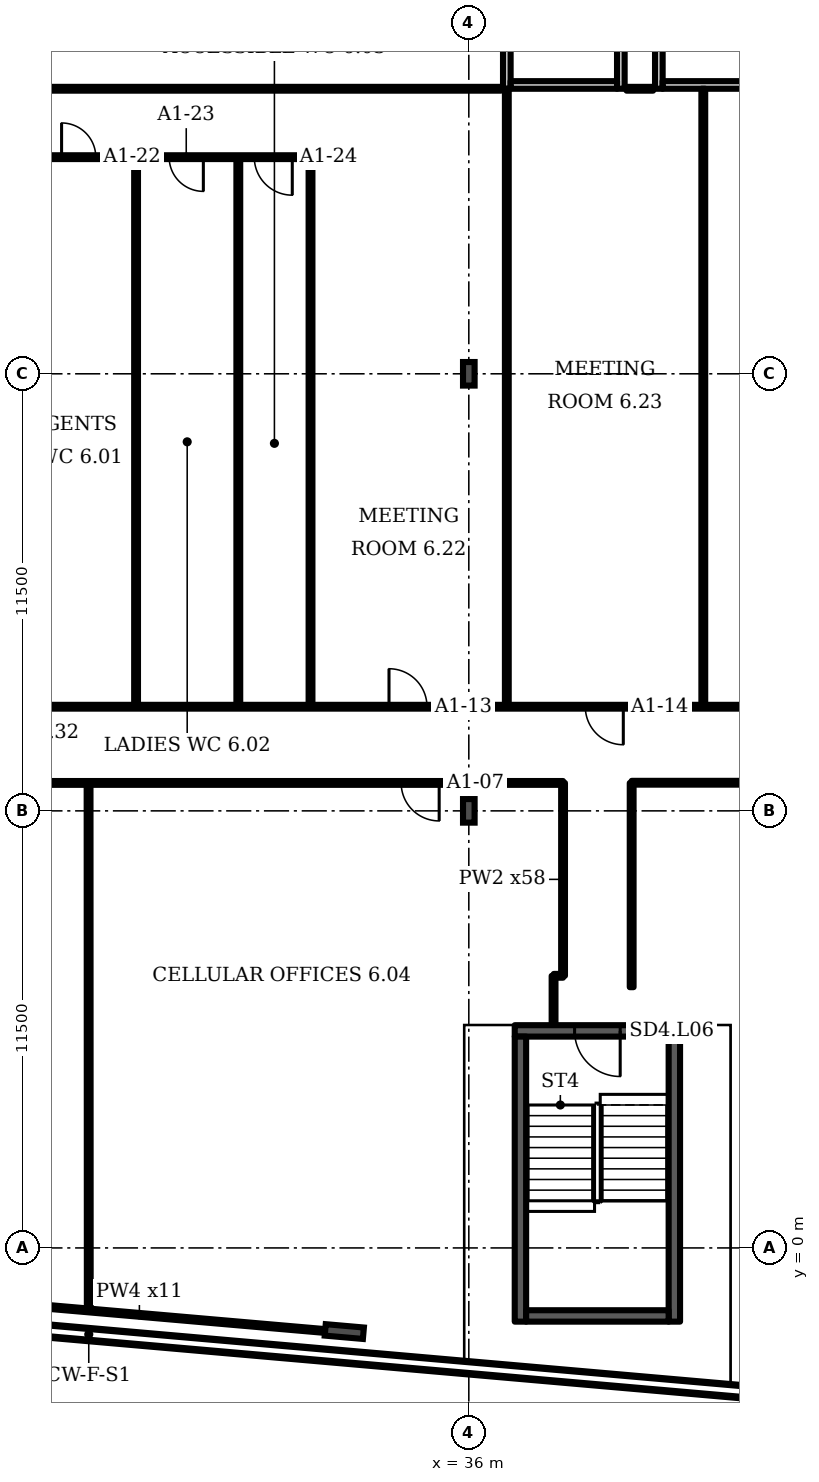
"""IFC4 building model, lengths in metres.
Left out: names, types, materials, properties, quantities, classifications, styles, units other than length and angle.
Written with IfcOpenShell. Run it as: python <this file> out.ifc"""

import sys

from ifc_helpers import new_model, si_unit, direction, frame, frame_2d, origin, origin_2d, place, context, subcontext, project, spatial, rectangle, i_section, extrude, element, fill, save


model = new_model("IFC4")
c1 = context("Model", 3, precision=1e-05, world=origin(), true_north=direction((0.0, 1.0)))
c2 = subcontext(c1, "Body", "Model", "MODEL_VIEW")
j1 = project(units=[si_unit("LENGTHUNIT", "METRE"), si_unit("PLANEANGLEUNIT", "RADIAN")], contexts=[c1])
p1 = place(None, origin())
s1 = spatial("IfcSite", under=j1, at=p1, CompositionType="ELEMENT")
p2 = place(p1, origin())
s2 = spatial("IfcBuilding", under=s1, at=p2, CompositionType="ELEMENT")
p3 = place(p2, frame((0.0, 0.0, 41.5)))
s3 = spatial("IfcBuildingStorey", under=s2, at=p3, CompositionType="ELEMENT", Elevation=41.5)
p4 = place(p3, frame((32.724, -2.2, 0.0), z_axis=(0.0, 0.0, 1.0), x_axis=(-0.087156, -0.996198, 0.0)))
e1 = element("IfcColumn", 1, at=p4, inside=s3, PredefinedType="COLUMN", context=c2, shape_type="SweptSolid", body=[
    extrude(i_section(OverallWidth=0.302, OverallDepth=1.008, WebThickness=0.021, FlangeThickness=0.04, FilletRadius=0.03, at=origin_2d()), origin(), (0.0, 0.0, 1.0), 3.6),
])
for number, where, z_axis, x_axis in (
    (2, (36.0, 11.5, 0.0), (0.0, 0.0, 1.0), (1.0, 0.0, 0.0)),
    (3, (36.0, 23.0, 0.0), (0.0, 0.0, 1.0), (1.0, 0.0, 0.0)),
):
    element("IfcColumn", number, at=place(p3, frame(where, z_axis=z_axis, x_axis=x_axis)), inside=s3, PredefinedType="COLUMN", context=c2, shape_type="SweptSolid", body=[
        extrude(i_section(OverallWidth=0.305, OverallDepth=0.62, WebThickness=0.021, FlangeThickness=0.04, FilletRadius=0.027, at=origin_2d()), origin(), (0.0, 0.0, 1.0), 3.6),
    ])
p5 = place(p3, frame((5.835, -0.516, 0.0), z_axis=(0.0, 0.0, 1.0), x_axis=(0.996195, -0.087152, 0.0)))
e4 = element("IfcWall", 4, at=p5, inside=s3, PredefinedType="SOLIDWALL", context=c2, shape_type="SweptSolid", body=[
    extrude(rectangle(XDim=40.333, YDim=0.35, at=frame_2d((20.167, 0.0))), origin(), (0.0, 0.0, 1.0), 1.0),
])
p6 = place(p3, frame((37.0, 30.5, 0.0), z_axis=(0.0, 0.0, 1.0), x_axis=(0.0, 1.0, 0.0)))
e5 = element("IfcWall", 5, at=p6, inside=s3, PredefinedType="PARTITIONING", context=c2, shape_type="SweptSolid", body=[
    extrude(rectangle(XDim=3.5, YDim=0.2, at=frame_2d((1.75, 0.0))), origin(), (0.0, 0.0, 1.0), 3.2),
])
p7 = place(p6, frame((1.2, 0.0, 0.0)))
e6 = element("IfcOpeningElement", 6, at=p7, cuts=e5, PredefinedType="OPENING", context=c2, shape_type="SweptSolid", body=[
    extrude(rectangle(XDim=1.1, YDim=2.1, at=frame_2d((0.55, 1.05))), frame((0.0, 0.11, 0.0), z_axis=(0.0, -1.0, 0.0), x_axis=(1.0, 0.0, 0.0)), (0.0, 0.0, 1.0), 0.22),
])
p8 = place(p3, frame((40.0, 30.5, 0.0), z_axis=(0.0, 0.0, 1.0), x_axis=(0.0, 1.0, 0.0)))
e7 = element("IfcWall", 7, at=p8, inside=s3, PredefinedType="PARTITIONING", context=c2, shape_type="SweptSolid", body=[
    extrude(rectangle(XDim=3.5, YDim=0.2, at=frame_2d((1.75, 0.0))), origin(), (0.0, 0.0, 1.0), 3.2),
])
p9 = place(p3, frame((37.1, 30.6, 0.0), z_axis=(0.0, 0.0, 1.0), x_axis=(1.0, 0.0, 0.0)))
e8 = element("IfcWall", 8, at=p9, inside=s3, PredefinedType="PARTITIONING", context=c2, shape_type="SweptSolid", body=[
    extrude(rectangle(XDim=2.8, YDim=0.2, at=frame_2d((1.4, 0.0))), origin(), (0.0, 0.0, 1.0), 3.2),
])
p10 = place(p3, frame((41.0, 30.5, 0.0), z_axis=(0.0, 0.0, 1.0), x_axis=(0.0, 1.0, 0.0)))
e9 = element("IfcWall", 9, at=p10, inside=s3, PredefinedType="PARTITIONING", context=c2, shape_type="SweptSolid", body=[
    extrude(rectangle(XDim=3.5, YDim=0.2, at=frame_2d((1.75, 0.0))), origin(), (0.0, 0.0, 1.0), 3.2),
])
p11 = place(p3, frame((41.1, 30.6, 0.0), z_axis=(0.0, 0.0, 1.0), x_axis=(1.0, 0.0, 0.0)))
e10 = element("IfcWall", 10, at=p11, inside=s3, PredefinedType="PARTITIONING", context=c2, shape_type="SweptSolid", body=[
    extrude(rectangle(XDim=2.8, YDim=0.2, at=frame_2d((1.4, 0.0))), origin(), (0.0, 0.0, 1.0), 3.2),
])
p12 = place(p3, frame((37.208, 5.711, 0.0), z_axis=(0.0, 0.0, 1.0), x_axis=(1.0, 0.0, 0.0)))
e11 = element("IfcWall", 11, at=p12, inside=s3, PredefinedType="SHEAR", context=c2, shape_type="SweptSolid", body=[
    extrude(rectangle(XDim=4.35, YDim=0.3, at=frame_2d((2.175, 0.0))), origin(), (0.0, 0.0, 1.0), 3.2),
])
p13 = place(p12, frame((1.575, 0.0, 0.0)))
e12 = element("IfcOpeningElement", 12, at=p13, cuts=e11, PredefinedType="OPENING", context=c2, shape_type="SweptSolid", body=[
    extrude(rectangle(XDim=1.2, YDim=2.1, at=frame_2d((0.6, 1.05))), frame((0.0, 0.16, 0.0), z_axis=(0.0, -1.0, 0.0), x_axis=(1.0, 0.0, 0.0)), (0.0, 0.0, 1.0), 0.32),
])
p14 = place(p3, frame((0.02, 12.235, 0.0), z_axis=(0.0, 0.0, 1.0), x_axis=(1.0, 0.0, 0.0)))
e13 = element("IfcWall", 13, at=p14, inside=s3, PredefinedType="PARTITIONING", context=c2, shape_type="SweptSolid", body=[
    extrude(rectangle(XDim=38.46, YDim=0.1, at=frame_2d((19.23, 0.0))), origin(), (0.0, 0.0, 1.0), 3.2),
])
p15 = place(p14, frame((2.405, 0.0, 0.0)))
e14 = element("IfcOpeningElement", 14, at=p15, cuts=e13, PredefinedType="OPENING", context=c2, shape_type="SweptSolid", body=[
    extrude(rectangle(XDim=1.0, YDim=2.1, at=frame_2d((0.5, 1.05))), frame((0.0, 0.06, 0.0), z_axis=(0.0, -1.0, 0.0), x_axis=(1.0, 0.0, 0.0)), (0.0, 0.0, 1.0), 0.12),
])
p16 = place(p14, frame((7.405, 0.0, 0.0)))
e15 = element("IfcOpeningElement", 15, at=p16, cuts=e13, PredefinedType="OPENING", context=c2, shape_type="SweptSolid", body=[
    extrude(rectangle(XDim=1.0, YDim=2.1, at=frame_2d((0.5, 1.05))), frame((0.0, 0.06, 0.0), z_axis=(0.0, -1.0, 0.0), x_axis=(1.0, 0.0, 0.0)), (0.0, 0.0, 1.0), 0.12),
])
p17 = place(p14, frame((13.405, 0.0, 0.0)))
e16 = element("IfcOpeningElement", 16, at=p17, cuts=e13, PredefinedType="OPENING", context=c2, shape_type="SweptSolid", body=[
    extrude(rectangle(XDim=1.0, YDim=2.1, at=frame_2d((0.5, 1.05))), frame((0.0, 0.06, 0.0), z_axis=(0.0, -1.0, 0.0), x_axis=(1.0, 0.0, 0.0)), (0.0, 0.0, 1.0), 0.12),
])
p18 = place(p14, frame((19.48, 0.0, 0.0)))
e17 = element("IfcOpeningElement", 17, at=p18, cuts=e13, PredefinedType="OPENING", context=c2, shape_type="SweptSolid", body=[
    extrude(rectangle(XDim=1.0, YDim=2.1, at=frame_2d((0.5, 1.05))), frame((0.0, 0.06, 0.0), z_axis=(0.0, -1.0, 0.0), x_axis=(1.0, 0.0, 0.0)), (0.0, 0.0, 1.0), 0.12),
])
p19 = place(p14, frame((22.205, 0.0, 0.0)))
e18 = element("IfcOpeningElement", 18, at=p19, cuts=e13, PredefinedType="OPENING", context=c2, shape_type="SweptSolid", body=[
    extrude(rectangle(XDim=1.0, YDim=2.1, at=frame_2d((0.5, 1.05))), frame((0.0, 0.06, 0.0), z_axis=(0.0, -1.0, 0.0), x_axis=(1.0, 0.0, 0.0)), (0.0, 0.0, 1.0), 0.12),
])
p20 = place(p14, frame((34.2, 0.0, 0.0)))
e19 = element("IfcOpeningElement", 19, at=p20, cuts=e13, PredefinedType="OPENING", context=c2, shape_type="SweptSolid", body=[
    extrude(rectangle(XDim=1.0, YDim=2.1, at=frame_2d((0.5, 1.05))), frame((0.0, 0.06, 0.0), z_axis=(0.0, -1.0, 0.0), x_axis=(1.0, 0.0, 0.0)), (0.0, 0.0, 1.0), 0.12),
])
p21 = place(p3, frame((10.8, 30.5, 0.0), z_axis=(0.0, 0.0, 1.0), x_axis=(1.0, 0.0, 0.0)))
e20 = element("IfcWall", 20, at=p21, inside=s3, PredefinedType="PARTITIONING", context=c2, shape_type="SweptSolid", body=[
    extrude(rectangle(XDim=26.05, YDim=0.1, at=frame_2d((13.025, 0.0))), origin(), (0.0, 0.0, 1.0), 3.2),
])
p22 = place(p21, frame((0.235, 0.0, 0.0)))
e21 = element("IfcOpeningElement", 21, at=p22, cuts=e20, PredefinedType="OPENING", context=c2, shape_type="SweptSolid", body=[
    extrude(rectangle(XDim=1.0, YDim=2.1, at=frame_2d((0.5, 1.05))), frame((0.0, 0.06, 0.0), z_axis=(0.0, -1.0, 0.0), x_axis=(1.0, 0.0, 0.0)), (0.0, 0.0, 1.0), 0.12),
])
p23 = place(p21, frame((10.955, 0.0, 0.0)))
e22 = element("IfcOpeningElement", 22, at=p23, cuts=e20, PredefinedType="OPENING", context=c2, shape_type="SweptSolid", body=[
    extrude(rectangle(XDim=1.0, YDim=2.1, at=frame_2d((0.5, 1.05))), frame((0.0, 0.06, 0.0), z_axis=(0.0, -1.0, 0.0), x_axis=(1.0, 0.0, 0.0)), (0.0, 0.0, 1.0), 0.12),
])
p24 = place(p3, frame((11.2, 14.24, 0.0), z_axis=(0.0, 0.0, 1.0), x_axis=(1.0, 0.0, 0.0)))
e23 = element("IfcWall", 23, at=p24, inside=s3, PredefinedType="PARTITIONING", context=c2, shape_type="SweptSolid", body=[
    extrude(rectangle(XDim=51.635, YDim=0.1, at=frame_2d((25.817, 0.0))), origin(), (0.0, 0.0, 1.0), 3.2),
])
p25 = place(p24, frame((0.115, 0.0, 0.0)))
e24 = element("IfcOpeningElement", 24, at=p25, cuts=e23, PredefinedType="OPENING", context=c2, shape_type="SweptSolid", body=[
    extrude(rectangle(XDim=1.0, YDim=2.1, at=frame_2d((0.5, 1.05))), frame((0.0, 0.06, 0.0), z_axis=(0.0, -1.0, 0.0), x_axis=(1.0, 0.0, 0.0)), (0.0, 0.0, 1.0), 0.12),
])
p26 = place(p24, frame((6.635, 0.0, 0.0)))
e25 = element("IfcOpeningElement", 25, at=p26, cuts=e23, PredefinedType="OPENING", context=c2, shape_type="SweptSolid", body=[
    extrude(rectangle(XDim=1.0, YDim=2.1, at=frame_2d((0.5, 1.05))), frame((0.0, 0.06, 0.0), z_axis=(0.0, -1.0, 0.0), x_axis=(1.0, 0.0, 0.0)), (0.0, 0.0, 1.0), 0.12),
])
p27 = place(p24, frame((22.7, 0.0, 0.0)))
e26 = element("IfcOpeningElement", 26, at=p27, cuts=e23, PredefinedType="OPENING", context=c2, shape_type="SweptSolid", body=[
    extrude(rectangle(XDim=1.0, YDim=2.1, at=frame_2d((0.5, 1.05))), frame((0.0, 0.06, 0.0), z_axis=(0.0, -1.0, 0.0), x_axis=(1.0, 0.0, 0.0)), (0.0, 0.0, 1.0), 0.12),
])
p28 = place(p24, frame((27.865, 0.0, 0.0)))
e27 = element("IfcOpeningElement", 27, at=p28, cuts=e23, PredefinedType="OPENING", context=c2, shape_type="SweptSolid", body=[
    extrude(rectangle(XDim=1.0, YDim=2.1, at=frame_2d((0.5, 1.05))), frame((0.0, 0.06, 0.0), z_axis=(0.0, -1.0, 0.0), x_axis=(1.0, 0.0, 0.0)), (0.0, 0.0, 1.0), 0.12),
])
p29 = place(p24, frame((34.065, 0.0, 0.0)))
e28 = element("IfcOpeningElement", 28, at=p29, cuts=e23, PredefinedType="OPENING", context=c2, shape_type="SweptSolid", body=[
    extrude(rectangle(XDim=1.8, YDim=2.1, at=frame_2d((0.9, 1.05))), frame((0.0, 0.06, 0.0), z_axis=(0.0, -1.0, 0.0), x_axis=(1.0, 0.0, 0.0)), (0.0, 0.0, 1.0), 0.12),
])
p30 = place(p24, frame((41.765, 0.0, 0.0)))
e29 = element("IfcOpeningElement", 29, at=p30, cuts=e23, PredefinedType="OPENING", context=c2, shape_type="SweptSolid", body=[
    extrude(rectangle(XDim=1.8, YDim=2.1, at=frame_2d((0.9, 1.05))), frame((0.0, 0.06, 0.0), z_axis=(0.0, -1.0, 0.0), x_axis=(1.0, 0.0, 0.0)), (0.0, 0.0, 1.0), 0.12),
])
p31 = place(p3, frame((24.335, 28.7, 0.0), z_axis=(0.0, 0.0, 1.0), x_axis=(1.0, 0.0, 0.0)))
e30 = element("IfcWall", 30, at=p31, inside=s3, PredefinedType="PARTITIONING", context=c2, shape_type="SweptSolid", body=[
    extrude(rectangle(XDim=7.5, YDim=0.1, at=frame_2d((3.75, 0.0))), origin(), (0.0, 0.0, 1.0), 3.2),
])
p32 = place(p31, frame((0.95, 0.0, 0.0)))
e31 = element("IfcOpeningElement", 31, at=p32, cuts=e30, PredefinedType="OPENING", context=c2, shape_type="SweptSolid", body=[
    extrude(rectangle(XDim=0.9, YDim=2.1, at=frame_2d((0.45, 1.05))), frame((0.0, 0.06, 0.0), z_axis=(0.0, -1.0, 0.0), x_axis=(1.0, 0.0, 0.0)), (0.0, 0.0, 1.0), 0.12),
])
p33 = place(p31, frame((3.78, 0.0, 0.0)))
e32 = element("IfcOpeningElement", 32, at=p33, cuts=e30, PredefinedType="OPENING", context=c2, shape_type="SweptSolid", body=[
    extrude(rectangle(XDim=0.9, YDim=2.1, at=frame_2d((0.45, 1.05))), frame((0.0, 0.06, 0.0), z_axis=(0.0, -1.0, 0.0), x_axis=(1.0, 0.0, 0.0)), (0.0, 0.0, 1.0), 0.12),
])
p34 = place(p31, frame((6.02, 0.0, 0.0)))
e33 = element("IfcOpeningElement", 33, at=p34, cuts=e30, PredefinedType="OPENING", context=c2, shape_type="SweptSolid", body=[
    extrude(rectangle(XDim=1.0, YDim=2.1, at=frame_2d((0.5, 1.05))), frame((0.0, 0.06, 0.0), z_axis=(0.0, -1.0, 0.0), x_axis=(1.0, 0.0, 0.0)), (0.0, 0.0, 1.0), 0.12),
])
p35 = place(p3, frame((26.0, -1.645, 0.0), z_axis=(0.0, 0.0, 1.0), x_axis=(-0.000352, 1.000004, 0.0)))
e34 = element("IfcWall", 34, at=p35, inside=s3, PredefinedType="PARTITIONING", context=c2, shape_type="SweptSolid", body=[
    extrude(rectangle(XDim=13.88, YDim=0.1, at=frame_2d((6.94, 0.0))), origin(), (0.0, 0.0, 1.0), 3.2),
])
for number, where, z_axis, x_axis in (
    (35, (27.245, 14.24, 0.0), (0.0, 0.0, 1.0), (0.0, 1.0, 0.0)),
    (36, (29.935, 14.24, 0.0), (0.0, 0.0, 1.0), (0.0, 1.0, 0.0)),
    (37, (31.835, 14.24, 0.0), (0.0, 0.0, 1.0), (0.0, 1.0, 0.0)),
):
    element("IfcWall", number, at=place(p3, frame(where, z_axis=z_axis, x_axis=x_axis)), inside=s3, PredefinedType="PARTITIONING", context=c2, shape_type="SweptSolid", body=[
        extrude(rectangle(XDim=14.46, YDim=0.1, at=frame_2d((7.23, 0.0))), origin(), (0.0, 0.0, 1.0), 3.2),
    ])
p36 = place(p3, frame((32.665, -2.225, 0.0), z_axis=(0.0, 0.0, 1.0), x_axis=(-0.99623, 0.086702, 0.0)))
e38 = element("IfcWall", 38, at=p36, inside=s3, PredefinedType="PARTITIONING", context=c2, shape_type="SweptSolid", body=[
    extrude(rectangle(XDim=10.706, YDim=0.1, at=frame_2d((5.353, 0.0))), origin(), (0.0, 0.0, 1.0), 2.58),
])
p37 = place(p3, frame((37.0, 14.24, 0.0), z_axis=(0.0, 0.0, 1.0), x_axis=(0.0, 1.0, 0.0)))
e39 = element("IfcWall", 39, at=p37, inside=s3, PredefinedType="PARTITIONING", context=c2, shape_type="SweptSolid", body=[
    extrude(rectangle(XDim=16.26, YDim=0.1, at=frame_2d((8.13, 0.0))), origin(), (0.0, 0.0, 1.0), 3.2),
])
p38 = place(p3, frame((38.23, 5.881, 0.0), z_axis=(0.0, 0.0, 1.0), x_axis=(0.0, 1.0, 0.0)))
e40 = element("IfcWall", 40, at=p38, inside=s3, PredefinedType="PARTITIONING", context=c2, shape_type="SweptSolid", body=[
    extrude(rectangle(XDim=1.279, YDim=0.1, at=frame_2d((0.64, 0.0))), origin(), (0.0, 0.0, 1.0), 3.2),
])
p39 = place(p3, frame((38.235, 7.16, 0.0), z_axis=(0.0, 0.0, 1.0), x_axis=(1.0, 0.0, 0.0)))
e41 = element("IfcWall", 41, at=p39, inside=s3, PredefinedType="PARTITIONING", context=c2, shape_type="SweptSolid", body=[
    extrude(rectangle(XDim=0.245, YDim=0.1, at=frame_2d((0.123, 0.0))), origin(), (0.0, 0.0, 1.0), 3.2),
])
p40 = place(p3, frame((38.48, 7.16, 0.0), z_axis=(0.0, 0.0, 1.0), x_axis=(0.0, 1.0, 0.0)))
e42 = element("IfcWall", 42, at=p40, inside=s3, PredefinedType="PARTITIONING", context=c2, shape_type="SweptSolid", body=[
    extrude(rectangle(XDim=5.075, YDim=0.1, at=frame_2d((2.538, 0.0))), origin(), (0.0, 0.0, 1.0), 3.2),
])
p41 = place(p3, frame((40.285, 6.861, 0.0), z_axis=(0.0, 0.0, 1.0), x_axis=(0.0, 1.0, 0.0)))
e43 = element("IfcWall", 43, at=p41, inside=s3, PredefinedType="PARTITIONING", context=c2, shape_type="SweptSolid", body=[
    extrude(rectangle(XDim=5.375, YDim=0.1, at=frame_2d((2.687, 0.0))), origin(), (0.0, 0.0, 1.0), 3.2),
])
p42 = place(p3, frame((40.285, 12.24, 0.0), z_axis=(0.0, 0.0, 1.0), x_axis=(1.0, 0.0, 0.0)))
e44 = element("IfcWall", 44, at=p42, inside=s3, PredefinedType="PARTITIONING", context=c2, shape_type="SweptSolid", body=[
    extrude(rectangle(XDim=33.255, YDim=0.1, at=frame_2d((16.627, 0.0))), origin(), (0.0, 0.0, 1.0), 3.2),
])
p43 = place(p42, frame((10.235, 0.0, 0.0)))
e45 = element("IfcOpeningElement", 45, at=p43, cuts=e44, PredefinedType="OPENING", context=c2, shape_type="SweptSolid", body=[
    extrude(rectangle(XDim=1.8, YDim=2.1, at=frame_2d((0.9, 1.05))), frame((0.0, 0.06, 0.0), z_axis=(0.0, -1.0, 0.0), x_axis=(1.0, 0.0, 0.0)), (0.0, 0.0, 1.0), 0.12),
])
p44 = place(p3, frame((42.17, 14.24, 0.0), z_axis=(0.0, 0.0, 1.0), x_axis=(0.0, 1.0, 0.0)))
e46 = element("IfcWall", 46, at=p44, inside=s3, PredefinedType="PARTITIONING", context=c2, shape_type="SweptSolid", body=[
    extrude(rectangle(XDim=16.26, YDim=0.1, at=frame_2d((8.13, 0.0))), origin(), (0.0, 0.0, 1.0), 3.2),
])
p45 = place(p3, frame((40.15, 30.5, 0.0), z_axis=(0.0, 0.0, 1.0), x_axis=(1.0, 0.0, 0.0)))
e47 = element("IfcWall", 47, at=p45, inside=s3, PredefinedType="PARTITIONING", context=c2, shape_type="SweptSolid", body=[
    extrude(rectangle(XDim=0.7, YDim=0.1, at=frame_2d((0.35, 0.0))), origin(), (0.0, 0.0, 1.0), 3.2),
])
for number, where, z_axis, x_axis in (
    (48, (37.358, -1.939, 0.0), (0.0, 0.0, 1.0), (0.0, 1.0, 0.0)),
    (49, (41.408, -1.939, 0.0), (0.0, 0.0, 1.0), (0.0, 1.0, 0.0)),
):
    element("IfcWall", number, at=place(p3, frame(where, z_axis=z_axis, x_axis=x_axis)), inside=s3, PredefinedType="SHEAR", context=c2, shape_type="SweptSolid", body=[
        extrude(rectangle(XDim=7.5, YDim=0.3, at=frame_2d((3.75, 0.0))), origin(), (0.0, 0.0, 1.0), 3.2),
    ])
p46 = place(p3, frame((37.508, -1.789, 0.0), z_axis=(0.0, 0.0, 1.0), x_axis=(1.0, 0.0, 0.0)))
e50 = element("IfcWall", 50, at=p46, inside=s3, PredefinedType="SHEAR", context=c2, shape_type="SweptSolid", body=[
    extrude(rectangle(XDim=3.75, YDim=0.3, at=frame_2d((1.875, 0.0))), origin(), (0.0, 0.0, 1.0), 3.2),
])
p47 = place(p13, origin())
e51 = element("IfcDoor", 51, at=p47, inside=s3, OperationType="SINGLE_SWING_RIGHT", PredefinedType="DOOR", context=c2, shape_type="SweptSolid", body=[
    extrude(rectangle(XDim=1.2, YDim=2.1, at=frame_2d((0.6, 1.05))), frame((0.0, 0.025, 0.0), z_axis=(0.0, -1.0, 0.0), x_axis=(1.0, 0.0, 0.0)), (0.0, 0.0, 1.0), 0.05),
])
fill(e12, e51)
p48 = place(p20, origin())
e52 = element("IfcDoor", 52, at=p48, inside=s3, OperationType="SINGLE_SWING_RIGHT", PredefinedType="DOOR", context=c2, shape_type="SweptSolid", body=[
    extrude(rectangle(XDim=1.0, YDim=2.1, at=frame_2d((0.5, 1.05))), frame((0.0, 0.025, 0.0), z_axis=(0.0, -1.0, 0.0), x_axis=(1.0, 0.0, 0.0)), (0.0, 0.0, 1.0), 0.05),
])
fill(e19, e52)
p49 = place(p27, origin())
e53 = element("IfcDoor", 53, at=p49, inside=s3, OperationType="SINGLE_SWING_LEFT", PredefinedType="DOOR", context=c2, shape_type="SweptSolid", body=[
    extrude(rectangle(XDim=1.0, YDim=2.1, at=frame_2d((0.5, 1.05))), frame((0.0, 0.025, 0.0), z_axis=(0.0, -1.0, 0.0), x_axis=(1.0, 0.0, 0.0)), (0.0, 0.0, 1.0), 0.05),
])
fill(e26, e53)
p50 = place(p28, origin())
e54 = element("IfcDoor", 54, at=p50, inside=s3, OperationType="SINGLE_SWING_RIGHT", PredefinedType="DOOR", context=c2, shape_type="SweptSolid", body=[
    extrude(rectangle(XDim=1.0, YDim=2.1, at=frame_2d((0.5, 1.05))), frame((0.0, 0.025, 0.0), z_axis=(0.0, -1.0, 0.0), x_axis=(1.0, 0.0, 0.0)), (0.0, 0.0, 1.0), 0.05),
])
fill(e27, e54)
p51 = place(p32, origin())
e55 = element("IfcDoor", 55, at=p51, inside=s3, OperationType="SINGLE_SWING_LEFT", PredefinedType="DOOR", context=c2, shape_type="SweptSolid", body=[
    extrude(rectangle(XDim=0.9, YDim=2.1, at=frame_2d((0.45, 1.05))), frame((0.0, 0.025, 0.0), z_axis=(0.0, -1.0, 0.0), x_axis=(1.0, 0.0, 0.0)), (0.0, 0.0, 1.0), 0.05),
])
fill(e31, e55)
p52 = place(p33, origin())
e56 = element("IfcDoor", 56, at=p52, inside=s3, OperationType="SINGLE_SWING_RIGHT", PredefinedType="DOOR", context=c2, shape_type="SweptSolid", body=[
    extrude(rectangle(XDim=0.9, YDim=2.1, at=frame_2d((0.45, 1.05))), frame((0.0, 0.025, 0.0), z_axis=(0.0, -1.0, 0.0), x_axis=(1.0, 0.0, 0.0)), (0.0, 0.0, 1.0), 0.05),
])
fill(e32, e56)
p53 = place(p34, origin())
e57 = element("IfcDoor", 57, at=p53, inside=s3, OperationType="SINGLE_SWING_RIGHT", PredefinedType="DOOR", context=c2, shape_type="SweptSolid", body=[
    extrude(rectangle(XDim=1.0, YDim=2.1, at=frame_2d((0.5, 1.05))), frame((0.0, 0.025, 0.0), z_axis=(0.0, -1.0, 0.0), x_axis=(1.0, 0.0, 0.0)), (0.0, 0.0, 1.0), 0.05),
])
fill(e33, e57)
save(model, sys.argv[1])
